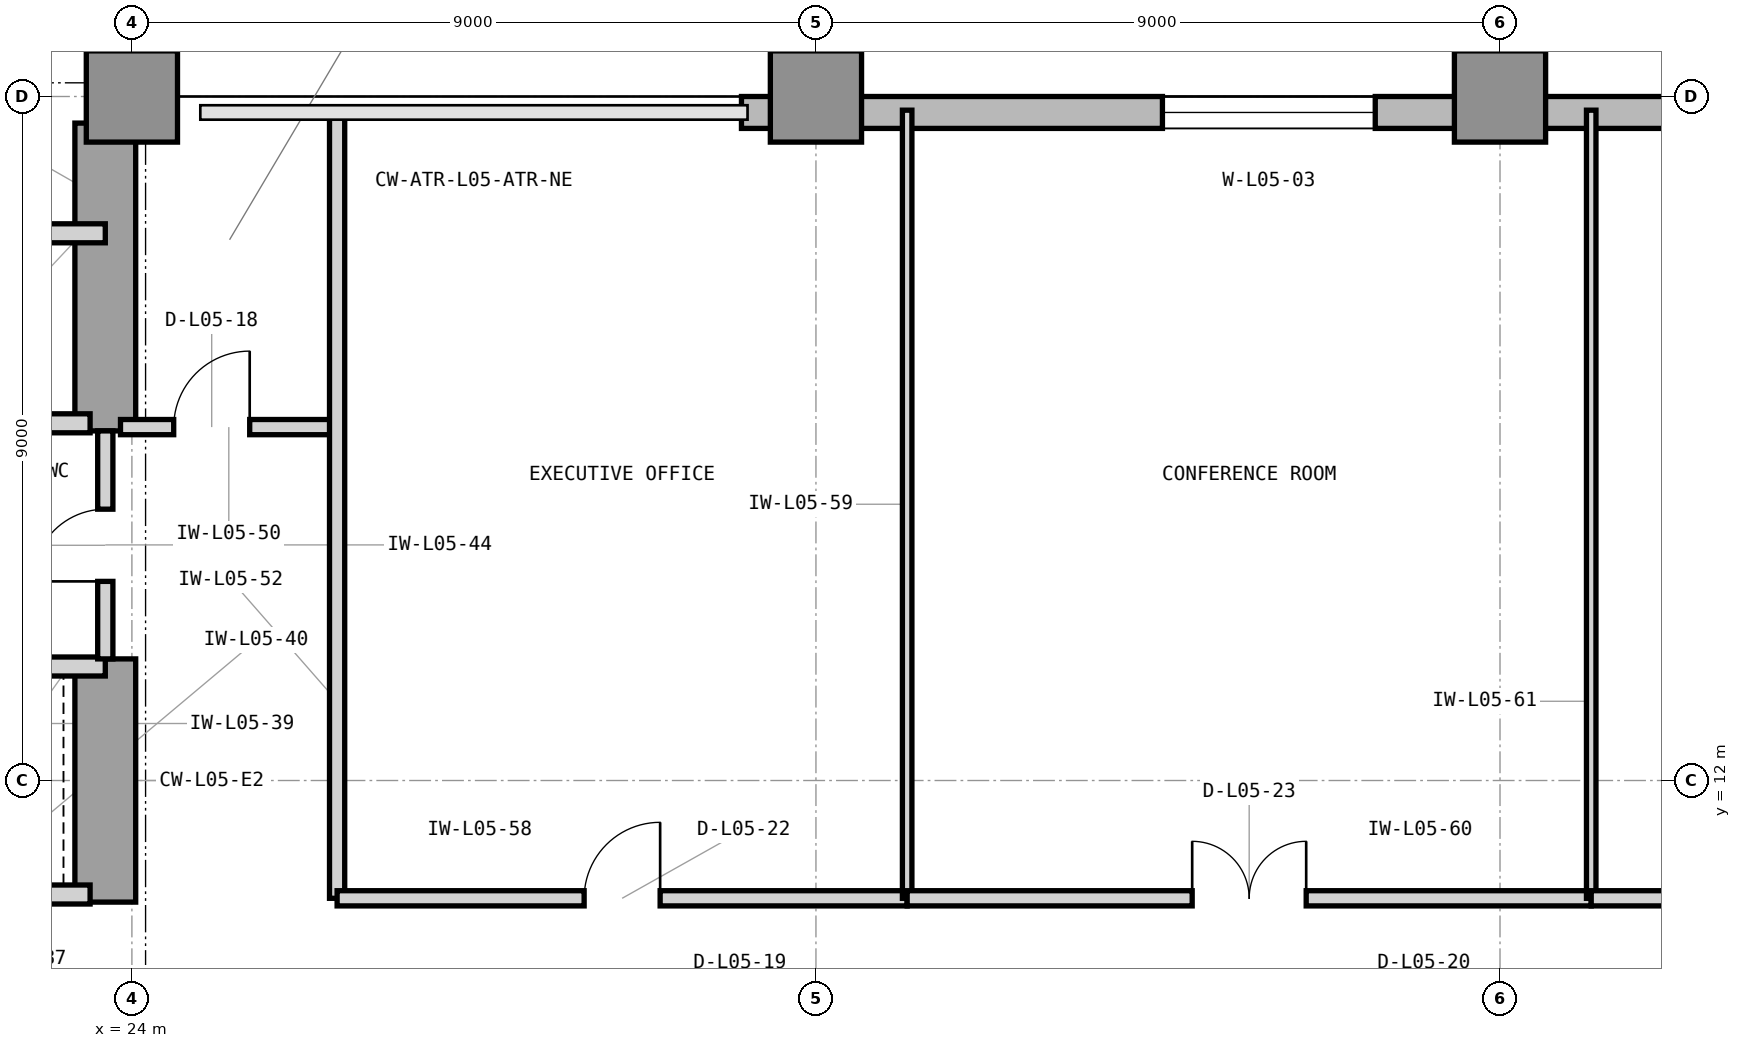
"""IFC4 building model, lengths in metres.
Left out: names, types, materials, properties, quantities, classifications, styles, units other than length and angle.
Written with IfcOpenShell. Run it as: python <this file> out.ifc"""

import sys

from ifc_helpers import new_model, si_unit, direction, frame, frame_2d, origin, origin_2d, place, context, subcontext, project, spatial, rectangle, extrude, element, fill, save


model = new_model("IFC4")
c1 = context("Model", 3, precision=1e-05, world=origin(), true_north=direction((0.0, 1.0)))
c2 = subcontext(c1, "Body", "Model", "MODEL_VIEW")
j1 = project(units=[si_unit("LENGTHUNIT", "METRE"), si_unit("PLANEANGLEUNIT", "RADIAN")], contexts=[c1])
p1 = place(None, origin())
s1 = spatial("IfcSite", under=j1, at=p1, CompositionType="ELEMENT")
p2 = place(p1, origin())
s2 = spatial("IfcBuilding", under=s1, at=p2, CompositionType="ELEMENT")
p3 = place(p2, frame((0.0, 0.0, 25.8)))
s3 = spatial("IfcBuildingStorey", under=s2, at=p3, CompositionType="ELEMENT", Elevation=25.8)
p4 = place(p3, frame((23.65, 10.4, 0.0), z_axis=(0.0, 0.0, 1.0), x_axis=(0.0, 1.0, 0.0)))
e1 = element("IfcWall", 1, at=p4, inside=s3, PredefinedType="SHEAR", context=c2, shape_type="SweptSolid", body=[
    extrude(rectangle(XDim=3.2, YDim=0.8, at=frame_2d((1.6, 0.0))), origin(), (0.0, 0.0, 1.0), 4.2),
])
p5 = place(p3, frame((23.65, 16.6, 0.0), z_axis=(0.0, 0.0, 1.0), x_axis=(0.0, 1.0, 0.0)))
e2 = element("IfcWall", 2, at=p5, inside=s3, PredefinedType="SHEAR", context=c2, shape_type="SweptSolid", body=[
    extrude(rectangle(XDim=4.05, YDim=0.8, at=frame_2d((2.025, 0.0))), origin(), (0.0, 0.0, 1.0), 4.2),
])
for number, where, z_axis, x_axis in (
    (3, (24.0, 21.0, 0.0), (0.0, 0.0, 1.0), (1.0, 0.0, 0.0)),
    (4, (33.0, 21.0, 0.0), (0.0, 0.0, 1.0), (1.0, 0.0, 0.0)),
    (5, (42.0, 21.0, 0.0), (0.0, 0.0, 1.0), (1.0, 0.0, 0.0)),
):
    element("IfcColumn", number, at=place(p3, frame(where, z_axis=z_axis, x_axis=x_axis)), inside=s3, PredefinedType="COLUMN", context=c2, shape_type="SweptSolid", body=[
        extrude(rectangle(XDim=1.2, YDim=1.2, at=origin_2d()), origin(), (0.0, 0.0, 1.0), 4.2),
    ])
p6 = place(p3, frame((64.4, 20.79, 0.0), z_axis=(0.0, 0.0, 1.0), x_axis=(-1.0, 0.0, 0.0)))
e6 = element("IfcWall", 6, at=p6, inside=s3, PredefinedType="STANDARD", context=c2, shape_type="SweptSolid", body=[
    extrude(rectangle(XDim=32.38, YDim=0.42, at=frame_2d((16.19, 0.0))), origin(), (0.0, 0.0, 1.0), 3.98),
])
p7 = place(p6, frame((24.042, 0.0, 0.85)))
e7 = element("IfcOpeningElement", 7, at=p7, cuts=e6, PredefinedType="OPENING", context=c2, shape_type="SweptSolid", body=[
    extrude(rectangle(XDim=2.8, YDim=2.45, at=frame_2d((1.4, 1.225))), frame((0.0, 0.22, 0.0), z_axis=(0.0, -1.0, 0.0), x_axis=(1.0, 0.0, 0.0)), (0.0, 0.0, 1.0), 0.44),
])
p8 = place(p6, frame((17.386, 0.0, 0.85)))
e8 = element("IfcOpeningElement", 8, at=p8, cuts=e6, PredefinedType="OPENING", context=c2, shape_type="SweptSolid", body=[
    extrude(rectangle(XDim=2.8, YDim=2.45, at=frame_2d((1.4, 1.225))), frame((0.0, 0.22, 0.0), z_axis=(0.0, -1.0, 0.0), x_axis=(1.0, 0.0, 0.0)), (0.0, 0.0, 1.0), 0.44),
])
p9 = place(p6, frame((8.436, 0.0, 0.85)))
e9 = element("IfcOpeningElement", 9, at=p9, cuts=e6, PredefinedType="OPENING", context=c2, shape_type="SweptSolid", body=[
    extrude(rectangle(XDim=1.2, YDim=2.45, at=frame_2d((0.6, 1.225))), frame((0.0, 0.22, 0.0), z_axis=(0.0, -1.0, 0.0), x_axis=(1.0, 0.0, 0.0)), (0.0, 0.0, 1.0), 0.44),
])
p10 = place(p3, frame((23.79, 21.0, 0.0), z_axis=(0.0, 0.0, 1.0), x_axis=(0.0, 1.0, 0.0)))
e10 = element("IfcWall", 10, at=p10, inside=s3, PredefinedType="STANDARD", context=c2, shape_type="SweptSolid", body=[
    extrude(rectangle(XDim=28.4, YDim=0.42, at=frame_2d((14.2, 0.0))), origin(), (0.0, 0.0, 1.0), 3.98),
])
p11 = place(p10, frame((10.433, 0.0, 0.85)))
e11 = element("IfcOpeningElement", 11, at=p11, cuts=e10, PredefinedType="OPENING", context=c2, shape_type="SweptSolid", body=[
    extrude(rectangle(XDim=2.8, YDim=2.45, at=frame_2d((1.4, 1.225))), frame((0.0, 0.22, 0.0), z_axis=(0.0, -1.0, 0.0), x_axis=(1.0, 0.0, 0.0)), (0.0, 0.0, 1.0), 0.44),
])
p12 = place(p10, frame((21.966, 0.0, 0.85)))
e12 = element("IfcOpeningElement", 12, at=p12, cuts=e10, PredefinedType="OPENING", context=c2, shape_type="SweptSolid", body=[
    extrude(rectangle(XDim=1.2, YDim=2.45, at=frame_2d((0.6, 1.225))), frame((0.0, 0.22, 0.0), z_axis=(0.0, -1.0, 0.0), x_axis=(1.0, 0.0, 0.0)), (0.0, 0.0, 1.0), 0.44),
])
p13 = place(p3, frame((21.05, 16.7, 0.0), z_axis=(0.0, 0.0, 1.0), x_axis=(1.0, 0.0, 0.0)))
e13 = element("IfcWall", 13, at=p13, inside=s3, PredefinedType="PARTITIONING", context=c2, shape_type="SweptSolid", body=[
    extrude(rectangle(XDim=2.4, YDim=0.25, at=frame_2d((1.2, 0.0))), origin(), (0.0, 0.0, 1.0), 3.426),
])
p14 = place(p3, frame((16.45, 19.2, 0.0), z_axis=(0.0, 0.0, 1.0), x_axis=(1.0, 0.0, 0.0)))
e14 = element("IfcWall", 14, at=p14, inside=s3, PredefinedType="PARTITIONING", context=c2, shape_type="SweptSolid", body=[
    extrude(rectangle(XDim=7.2, YDim=0.25, at=frame_2d((3.6, 0.0))), origin(), (0.0, 0.0, 1.0), 3.97),
])
p15 = place(p3, frame((21.05, 10.5, 0.0), z_axis=(0.0, 0.0, 1.0), x_axis=(1.0, 0.0, 0.0)))
e15 = element("IfcWall", 15, at=p15, inside=s3, PredefinedType="PARTITIONING", context=c2, shape_type="SweptSolid", body=[
    extrude(rectangle(XDim=2.4, YDim=0.25, at=frame_2d((1.2, 0.0))), origin(), (0.0, 0.0, 1.0), 3.426),
])
p16 = place(p3, frame((14.7, 13.5, 0.0), z_axis=(0.0, 0.0, 1.0), x_axis=(1.0, 0.0, 0.0)))
e16 = element("IfcWall", 16, at=p16, inside=s3, PredefinedType="PARTITIONING", context=c2, shape_type="SweptSolid", body=[
    extrude(rectangle(XDim=8.95, YDim=0.25, at=frame_2d((4.475, 0.0))), origin(), (0.0, 0.0, 1.0), 3.426),
])
p17 = place(p3, frame((23.65, 13.6, 0.0), z_axis=(0.0, 0.0, 1.0), x_axis=(0.0, 1.0, 0.0)))
e17 = element("IfcWall", 17, at=p17, inside=s3, PredefinedType="PARTITIONING", context=c2, shape_type="SweptSolid", body=[
    extrude(rectangle(XDim=3.0, YDim=0.2, at=frame_2d((1.5, 0.0))), origin(), (0.0, 0.0, 1.0), 3.97),
])
p18 = place(p17, frame((1.02, 0.0, 0.0)))
e18 = element("IfcOpeningElement", 18, at=p18, cuts=e17, PredefinedType="OPENING", context=c2, shape_type="SweptSolid", body=[
    extrude(rectangle(XDim=0.95, YDim=2.1, at=frame_2d((0.475, 1.05))), frame((0.0, 0.11, 0.0), z_axis=(0.0, -1.0, 0.0), x_axis=(1.0, 0.0, 0.0)), (0.0, 0.0, 1.0), 0.22),
])
p19 = place(p3, frame((23.85, 16.65, 0.0), z_axis=(0.0, 0.0, 1.0), x_axis=(1.0, 0.0, 0.0)))
e19 = element("IfcWall", 19, at=p19, inside=s3, PredefinedType="PARTITIONING", context=c2, shape_type="SweptSolid", body=[
    extrude(rectangle(XDim=2.85, YDim=0.2, at=frame_2d((1.425, 0.0))), origin(), (0.0, 0.0, 1.0), 3.97),
])
p20 = place(p19, frame((0.7, 0.0, 0.0)))
e20 = element("IfcOpeningElement", 20, at=p20, cuts=e19, PredefinedType="OPENING", context=c2, shape_type="SweptSolid", body=[
    extrude(rectangle(XDim=1.0, YDim=2.15, at=frame_2d((0.5, 1.075))), frame((0.0, 0.11, 0.0), z_axis=(0.0, -1.0, 0.0), x_axis=(1.0, 0.0, 0.0)), (0.0, 0.0, 1.0), 0.22),
])
p21 = place(p3, frame((26.7, 10.45, 0.0), z_axis=(0.0, 0.0, 1.0), x_axis=(0.0, 1.0, 0.0)))
e21 = element("IfcWall", 21, at=p21, inside=s3, PredefinedType="PARTITIONING", context=c2, shape_type="SweptSolid", body=[
    extrude(rectangle(XDim=10.37, YDim=0.2, at=frame_2d((5.185, 0.0))), origin(), (0.0, 0.0, 1.0), 3.97),
])
p22 = place(p3, frame((26.7, 10.45, 0.0), z_axis=(0.0, 0.0, 1.0), x_axis=(1.0, 0.0, 0.0)))
e22 = element("IfcWall", 22, at=p22, inside=s3, PredefinedType="PARTITIONING", context=c2, shape_type="SweptSolid", body=[
    extrude(rectangle(XDim=7.5, YDim=0.2, at=frame_2d((3.75, 0.0))), origin(), (0.0, 0.0, 1.0), 3.97),
])
p23 = place(p22, frame((3.25, 0.0, 0.0)))
e23 = element("IfcOpeningElement", 23, at=p23, cuts=e22, PredefinedType="OPENING", context=c2, shape_type="SweptSolid", body=[
    extrude(rectangle(XDim=1.0, YDim=2.15, at=frame_2d((0.5, 1.075))), frame((0.0, 0.11, 0.0), z_axis=(0.0, -1.0, 0.0), x_axis=(1.0, 0.0, 0.0)), (0.0, 0.0, 1.0), 0.22),
])
p24 = place(p3, frame((34.2, 10.45, 0.0), z_axis=(0.0, 0.0, 1.0), x_axis=(0.0, 1.0, 0.0)))
e24 = element("IfcWall", 24, at=p24, inside=s3, PredefinedType="PARTITIONING", context=c2, shape_type="SweptSolid", body=[
    extrude(rectangle(XDim=10.37, YDim=0.125, at=frame_2d((5.185, 0.0))), origin(), (0.0, 0.0, 1.0), 3.97),
])
p25 = place(p3, frame((34.2, 10.45, 0.0), z_axis=(0.0, 0.0, 1.0), x_axis=(1.0, 0.0, 0.0)))
e25 = element("IfcWall", 25, at=p25, inside=s3, PredefinedType="PARTITIONING", context=c2, shape_type="SweptSolid", body=[
    extrude(rectangle(XDim=9.0, YDim=0.2, at=frame_2d((4.5, 0.0))), origin(), (0.0, 0.0, 1.0), 3.97),
])
p26 = place(p25, frame((3.75, 0.0, 0.0)))
e26 = element("IfcOpeningElement", 26, at=p26, cuts=e25, PredefinedType="OPENING", context=c2, shape_type="SweptSolid", body=[
    extrude(rectangle(XDim=1.5, YDim=2.3, at=frame_2d((0.75, 1.15))), frame((0.0, 0.11, 0.0), z_axis=(0.0, -1.0, 0.0), x_axis=(1.0, 0.0, 0.0)), (0.0, 0.0, 1.0), 0.22),
])
p27 = place(p3, frame((43.2, 10.45, 0.0), z_axis=(0.0, 0.0, 1.0), x_axis=(0.0, 1.0, 0.0)))
e27 = element("IfcWall", 27, at=p27, inside=s3, PredefinedType="PARTITIONING", context=c2, shape_type="SweptSolid", body=[
    extrude(rectangle(XDim=10.37, YDim=0.125, at=frame_2d((5.185, 0.0))), origin(), (0.0, 0.0, 1.0), 3.97),
])
p28 = place(p3, frame((43.2, 10.45, 0.0), z_axis=(0.0, 0.0, 1.0), x_axis=(1.0, 0.0, 0.0)))
e28 = element("IfcWall", 28, at=p28, inside=s3, PredefinedType="PARTITIONING", context=c2, shape_type="SweptSolid", body=[
    extrude(rectangle(XDim=9.0, YDim=0.2, at=frame_2d((4.5, 0.0))), origin(), (0.0, 0.0, 1.0), 3.97),
])
p29 = place(p28, frame((4.0, 0.0, 0.0)))
e29 = element("IfcOpeningElement", 29, at=p29, cuts=e28, PredefinedType="OPENING", context=c2, shape_type="SweptSolid", body=[
    extrude(rectangle(XDim=1.0, YDim=2.15, at=frame_2d((0.5, 1.075))), frame((0.0, 0.11, 0.0), z_axis=(0.0, -1.0, 0.0), x_axis=(1.0, 0.0, 0.0)), (0.0, 0.0, 1.0), 0.22),
])
p30 = place(p7, origin())
e30 = element("IfcWindow", 30, at=p30, inside=s3, PartitioningType="SINGLE_PANEL", PredefinedType="WINDOW", context=c2, shape_type="SweptSolid", body=[
    extrude(rectangle(XDim=2.8, YDim=2.45, at=frame_2d((1.4, 1.225))), frame((0.0, 0.11, 0.0), z_axis=(0.0, -1.0, 0.0), x_axis=(1.0, 0.0, 0.0)), (0.0, 0.0, 1.0), 0.06),
])
fill(e7, e30)
p31 = place(p18, origin())
e31 = element("IfcDoor", 31, at=p31, inside=s3, OperationType="SINGLE_SWING_LEFT", PredefinedType="DOOR", context=c2, shape_type="SweptSolid", body=[
    extrude(rectangle(XDim=0.95, YDim=2.1, at=frame_2d((0.475, 1.05))), frame((0.0, 0.025, 0.0), z_axis=(0.0, -1.0, 0.0), x_axis=(1.0, 0.0, 0.0)), (0.0, 0.0, 1.0), 0.05),
])
fill(e18, e31)
p32 = place(p20, origin())
e32 = element("IfcDoor", 32, at=p32, inside=s3, OperationType="SINGLE_SWING_RIGHT", PredefinedType="DOOR", context=c2, shape_type="SweptSolid", body=[
    extrude(rectangle(XDim=1.0, YDim=2.15, at=frame_2d((0.5, 1.075))), frame((0.0, 0.025, 0.0), z_axis=(0.0, -1.0, 0.0), x_axis=(1.0, 0.0, 0.0)), (0.0, 0.0, 1.0), 0.05),
])
fill(e20, e32)
p33 = place(p23, origin())
e33 = element("IfcDoor", 33, at=p33, inside=s3, OperationType="SINGLE_SWING_RIGHT", PredefinedType="DOOR", context=c2, shape_type="SweptSolid", body=[
    extrude(rectangle(XDim=1.0, YDim=2.15, at=frame_2d((0.5, 1.075))), frame((0.0, 0.025, 0.0), z_axis=(0.0, -1.0, 0.0), x_axis=(1.0, 0.0, 0.0)), (0.0, 0.0, 1.0), 0.05),
])
fill(e23, e33)
p34 = place(p26, origin())
e34 = element("IfcDoor", 34, at=p34, inside=s3, OperationType="DOUBLE_DOOR_SINGLE_SWING", PredefinedType="DOOR", context=c2, shape_type="SweptSolid", body=[
    extrude(rectangle(XDim=1.5, YDim=2.3, at=frame_2d((0.75, 1.15))), frame((0.0, 0.025, 0.0), z_axis=(0.0, -1.0, 0.0), x_axis=(1.0, 0.0, 0.0)), (0.0, 0.0, 1.0), 0.05),
])
fill(e26, e34)
save(model, sys.argv[1])
